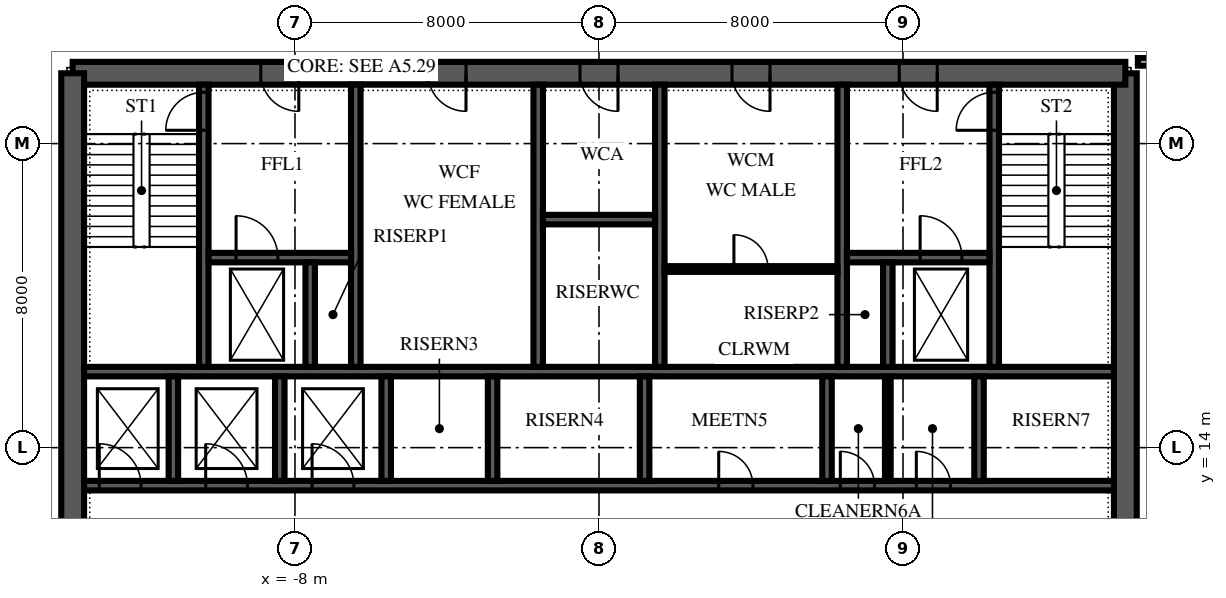
"""IFC4 building model, lengths in metres.
Left out: names, types, materials, properties, quantities, classifications, styles, units other than length and angle.
Written with IfcOpenShell. Run it as: python <this file> out.ifc"""

import sys

from ifc_helpers import new_model, si_unit, direction, frame, frame_2d, origin, place, context, subcontext, project, spatial, polyline, rectangle, outline, extrude, element, fill, save


model = new_model("IFC4")
c1 = context("Model", 3, precision=1e-05, world=origin(), true_north=direction((0.0, 1.0)))
c2 = subcontext(c1, "Body", "Model", "MODEL_VIEW")
j1 = project(units=[si_unit("LENGTHUNIT", "METRE"), si_unit("PLANEANGLEUNIT", "RADIAN")], contexts=[c1])
p1 = place(None, origin())
s1 = spatial("IfcSite", under=j1, at=p1, CompositionType="ELEMENT")
p2 = place(p1, origin())
s2 = spatial("IfcBuilding", under=s1, at=p2, CompositionType="ELEMENT")
p3 = place(p2, frame((0.0, 0.0, 202.0)))
s3 = spatial("IfcBuildingStorey", under=s2, at=p3, CompositionType="ELEMENT", Elevation=202.0)
p4 = place(p3, frame((13.85, 6.15, 0.0), z_axis=(0.0, 0.0, 1.0), x_axis=(0.0, 1.0, 0.0)))
e1 = element("IfcWall", 1, at=p4, inside=s3, PredefinedType="SHEAR", context=c2, shape_type="SweptSolid", body=[
    extrude(outline(polyline([(0.0, -0.3), (17.7, -0.3), (17.7, 0.0), (17.4, 0.0), (17.4, 0.3), (0.3, 0.3), (0.3, 0.0), (0.0, 0.0), (0.0, -0.3)])), origin(), (0.0, 0.0, 1.0), 4.0),
])
p5 = place(p4, frame((4.15, 0.0, 0.0)))
e2 = element("IfcOpeningElement", 2, at=p5, cuts=e1, PredefinedType="OPENING", context=c2, shape_type="SweptSolid", body=[
    extrude(rectangle(XDim=1.8, YDim=2.4, at=frame_2d((0.9, 1.2))), frame((0.0, 0.315, 0.0), z_axis=(0.0, -1.0, 0.0), x_axis=(1.0, 0.0, 0.0)), (0.0, 0.0, 1.0), 0.63),
])
p6 = place(p3, frame((13.85, 23.85, 0.0), z_axis=(0.0, 0.0, 1.0), x_axis=(-1.0, 0.0, 0.0)))
e3 = element("IfcWall", 3, at=p6, inside=s3, PredefinedType="SHEAR", context=c2, shape_type="SweptSolid", body=[
    extrude(rectangle(XDim=27.7, YDim=0.6, at=frame_2d((13.85, 0.0))), origin(), (0.0, 0.0, 1.0), 4.0),
])
p7 = place(p6, frame((21.75, 0.0, 0.0)))
e4 = element("IfcOpeningElement", 4, at=p7, cuts=e3, PredefinedType="OPENING", context=c2, shape_type="SweptSolid", body=[
    extrude(rectangle(XDim=1.0, YDim=2.1, at=frame_2d((0.5, 1.05))), frame((0.0, 0.315, 0.0), z_axis=(0.0, -1.0, 0.0), x_axis=(1.0, 0.0, 0.0)), (0.0, 0.0, 1.0), 0.63),
])
p8 = place(p6, frame((4.95, 0.0, 0.0)))
e5 = element("IfcOpeningElement", 5, at=p8, cuts=e3, PredefinedType="OPENING", context=c2, shape_type="SweptSolid", body=[
    extrude(rectangle(XDim=1.0, YDim=2.1, at=frame_2d((0.5, 1.05))), frame((0.0, 0.315, 0.0), z_axis=(0.0, -1.0, 0.0), x_axis=(1.0, 0.0, 0.0)), (0.0, 0.0, 1.0), 0.63),
])
p9 = place(p6, frame((17.35, 0.0, 0.0)))
e6 = element("IfcOpeningElement", 6, at=p9, cuts=e3, PredefinedType="OPENING", context=c2, shape_type="SweptSolid", body=[
    extrude(rectangle(XDim=1.0, YDim=2.1, at=frame_2d((0.5, 1.05))), frame((0.0, 0.315, 0.0), z_axis=(0.0, -1.0, 0.0), x_axis=(1.0, 0.0, 0.0)), (0.0, 0.0, 1.0), 0.63),
])
p10 = place(p6, frame((13.35, 0.0, 0.0)))
e7 = element("IfcOpeningElement", 7, at=p10, cuts=e3, PredefinedType="OPENING", context=c2, shape_type="SweptSolid", body=[
    extrude(rectangle(XDim=1.0, YDim=2.1, at=frame_2d((0.5, 1.05))), frame((0.0, 0.315, 0.0), z_axis=(0.0, -1.0, 0.0), x_axis=(1.0, 0.0, 0.0)), (0.0, 0.0, 1.0), 0.63),
])
p11 = place(p6, frame((9.35, 0.0, 0.0)))
e8 = element("IfcOpeningElement", 8, at=p11, cuts=e3, PredefinedType="OPENING", context=c2, shape_type="SweptSolid", body=[
    extrude(rectangle(XDim=1.0, YDim=2.1, at=frame_2d((0.5, 1.05))), frame((0.0, 0.315, 0.0), z_axis=(0.0, -1.0, 0.0), x_axis=(1.0, 0.0, 0.0)), (0.0, 0.0, 1.0), 0.63),
])
p12 = place(p3, frame((-13.85, 23.85, 0.0), z_axis=(0.0, 0.0, 1.0), x_axis=(0.0, -1.0, 0.0)))
e9 = element("IfcWall", 9, at=p12, inside=s3, PredefinedType="SHEAR", context=c2, shape_type="SweptSolid", body=[
    extrude(outline(polyline([(0.0, -0.3), (17.7, -0.3), (17.7, 0.0), (17.4, 0.0), (17.4, 0.3), (0.3, 0.3), (0.3, 0.0), (0.0, 0.0), (0.0, -0.3)])), origin(), (0.0, 0.0, 1.0), 4.0),
])
p13 = place(p12, frame((11.75, 0.0, 0.0)))
e10 = element("IfcOpeningElement", 10, at=p13, cuts=e9, PredefinedType="OPENING", context=c2, shape_type="SweptSolid", body=[
    extrude(rectangle(XDim=1.8, YDim=2.4, at=frame_2d((0.9, 1.2))), frame((0.0, 0.315, 0.0), z_axis=(0.0, -1.0, 0.0), x_axis=(1.0, 0.0, 0.0)), (0.0, 0.0, 1.0), 0.63),
])
p14 = place(p3, frame((-13.55, 13.0, 0.0), z_axis=(0.0, 0.0, 1.0), x_axis=(1.0, 0.0, 0.0)))
e11 = element("IfcWall", 11, at=p14, inside=s3, PredefinedType="SHEAR", context=c2, shape_type="SweptSolid", body=[
    extrude(rectangle(XDim=27.1, YDim=0.25, at=frame_2d((13.55, 0.0))), origin(), (0.0, 0.0, 1.0), 4.0),
])
p15 = place(p14, frame((0.4, 0.0, 0.0)))
e12 = element("IfcOpeningElement", 12, at=p15, cuts=e11, PredefinedType="OPENING", context=c2, shape_type="SweptSolid", body=[
    extrude(rectangle(XDim=1.1, YDim=2.1, at=frame_2d((0.55, 1.05))), frame((0.0, 0.14, 0.0), z_axis=(0.0, -1.0, 0.0), x_axis=(1.0, 0.0, 0.0)), (0.0, 0.0, 1.0), 0.28),
])
p16 = place(p14, frame((3.2, 0.0, 0.0)))
e13 = element("IfcOpeningElement", 13, at=p16, cuts=e11, PredefinedType="OPENING", context=c2, shape_type="SweptSolid", body=[
    extrude(rectangle(XDim=1.1, YDim=2.1, at=frame_2d((0.55, 1.05))), frame((0.0, 0.14, 0.0), z_axis=(0.0, -1.0, 0.0), x_axis=(1.0, 0.0, 0.0)), (0.0, 0.0, 1.0), 0.28),
])
p17 = place(p14, frame((6.0, 0.0, 0.0)))
e14 = element("IfcOpeningElement", 14, at=p17, cuts=e11, PredefinedType="OPENING", context=c2, shape_type="SweptSolid", body=[
    extrude(rectangle(XDim=1.1, YDim=2.1, at=frame_2d((0.55, 1.05))), frame((0.0, 0.14, 0.0), z_axis=(0.0, -1.0, 0.0), x_axis=(1.0, 0.0, 0.0)), (0.0, 0.0, 1.0), 0.28),
])
p18 = place(p14, frame((16.7, 0.0, 0.0)))
e15 = element("IfcOpeningElement", 15, at=p18, cuts=e11, PredefinedType="OPENING", context=c2, shape_type="SweptSolid", body=[
    extrude(rectangle(XDim=0.9, YDim=2.1, at=frame_2d((0.45, 1.05))), frame((0.0, 0.14, 0.0), z_axis=(0.0, -1.0, 0.0), x_axis=(1.0, 0.0, 0.0)), (0.0, 0.0, 1.0), 0.28),
])
p19 = place(p14, frame((19.9, 0.0, 0.0)))
e16 = element("IfcOpeningElement", 16, at=p19, cuts=e11, PredefinedType="OPENING", context=c2, shape_type="SweptSolid", body=[
    extrude(rectangle(XDim=0.9, YDim=2.1, at=frame_2d((0.45, 1.05))), frame((0.0, 0.14, 0.0), z_axis=(0.0, -1.0, 0.0), x_axis=(1.0, 0.0, 0.0)), (0.0, 0.0, 1.0), 0.28),
])
p20 = place(p14, frame((21.9, 0.0, 0.0)))
e17 = element("IfcOpeningElement", 17, at=p20, cuts=e11, PredefinedType="OPENING", context=c2, shape_type="SweptSolid", body=[
    extrude(rectangle(XDim=0.9, YDim=2.1, at=frame_2d((0.45, 1.05))), frame((0.0, 0.14, 0.0), z_axis=(0.0, -1.0, 0.0), x_axis=(1.0, 0.0, 0.0)), (0.0, 0.0, 1.0), 0.28),
])
p21 = place(p3, frame((-13.55, 16.0, 0.0), z_axis=(0.0, 0.0, 1.0), x_axis=(1.0, 0.0, 0.0)))
e18 = element("IfcWall", 18, at=p21, inside=s3, PredefinedType="SHEAR", context=c2, shape_type="SweptSolid", body=[
    extrude(rectangle(XDim=27.1, YDim=0.25, at=frame_2d((13.55, 0.0))), origin(), (0.0, 0.0, 1.0), 4.0),
])
for number, where, z_axis, x_axis in (
    (19, (-11.2, 13.125, 0.0), (0.0, 0.0, 1.0), (0.0, 1.0, 0.0)),
    (20, (-8.4, 13.125, 0.0), (0.0, 0.0, 1.0), (0.0, 1.0, 0.0)),
    (21, (-5.6, 13.125, 0.0), (0.0, 0.0, 1.0), (0.0, 1.0, 0.0)),
    (22, (-2.8, 13.125, 0.0), (0.0, 0.0, 1.0), (0.0, 1.0, 0.0)),
    (23, (1.2, 13.125, 0.0), (0.0, 0.0, 1.0), (0.0, 1.0, 0.0)),
    (24, (6.0, 13.125, 0.0), (0.0, 0.0, 1.0), (0.0, 1.0, 0.0)),
    (25, (10.0, 13.125, 0.0), (0.0, 0.0, 1.0), (0.0, 1.0, 0.0)),
):
    element("IfcWall", number, at=place(p3, frame(where, z_axis=z_axis, x_axis=x_axis)), inside=s3, PredefinedType="SHEAR", context=c2, shape_type="SweptSolid", body=[
        extrude(rectangle(XDim=2.75, YDim=0.25, at=frame_2d((1.375, 0.0))), origin(), (0.0, 0.0, 1.0), 4.0),
    ])
p22 = place(p3, frame((-10.4, 16.125, 0.0), z_axis=(0.0, 0.0, 1.0), x_axis=(0.0, 1.0, 0.0)))
e26 = element("IfcWall", 26, at=p22, inside=s3, PredefinedType="SHEAR", context=c2, shape_type="SweptSolid", body=[
    extrude(rectangle(XDim=7.425, YDim=0.25, at=frame_2d((3.712, 0.0))), origin(), (0.0, 0.0, 1.0), 4.0),
])
p23 = place(p22, frame((6.225, 0.0, 0.0)))
e27 = element("IfcOpeningElement", 27, at=p23, cuts=e26, PredefinedType="OPENING", context=c2, shape_type="SweptSolid", body=[
    extrude(rectangle(XDim=1.0, YDim=2.1, at=frame_2d((0.5, 1.05))), frame((0.0, 0.14, 0.0), z_axis=(0.0, -1.0, 0.0), x_axis=(1.0, 0.0, 0.0)), (0.0, 0.0, 1.0), 0.28),
])
for number, where, z_axis, x_axis in (
    (28, (-6.4, 16.125, 0.0), (0.0, 0.0, 1.0), (0.0, 1.0, 0.0)),
    (29, (-1.6, 16.125, 0.0), (0.0, 0.0, 1.0), (0.0, 1.0, 0.0)),
    (30, (1.6, 16.125, 0.0), (0.0, 0.0, 1.0), (0.0, 1.0, 0.0)),
    (31, (6.4, 16.125, 0.0), (0.0, 0.0, 1.0), (0.0, 1.0, 0.0)),
):
    element("IfcWall", number, at=place(p3, frame(where, z_axis=z_axis, x_axis=x_axis)), inside=s3, PredefinedType="SHEAR", context=c2, shape_type="SweptSolid", body=[
        extrude(rectangle(XDim=7.425, YDim=0.25, at=frame_2d((3.712, 0.0))), origin(), (0.0, 0.0, 1.0), 4.0),
    ])
p24 = place(p3, frame((10.4, 16.125, 0.0), z_axis=(0.0, 0.0, 1.0), x_axis=(0.0, 1.0, 0.0)))
e32 = element("IfcWall", 32, at=p24, inside=s3, PredefinedType="SHEAR", context=c2, shape_type="SweptSolid", body=[
    extrude(rectangle(XDim=7.425, YDim=0.25, at=frame_2d((3.712, 0.0))), origin(), (0.0, 0.0, 1.0), 4.0),
])
p25 = place(p24, frame((6.225, 0.0, 0.0)))
e33 = element("IfcOpeningElement", 33, at=p25, cuts=e32, PredefinedType="OPENING", context=c2, shape_type="SweptSolid", body=[
    extrude(rectangle(XDim=1.0, YDim=2.1, at=frame_2d((0.5, 1.05))), frame((0.0, 0.14, 0.0), z_axis=(0.0, -1.0, 0.0), x_axis=(1.0, 0.0, 0.0)), (0.0, 0.0, 1.0), 0.28),
])
p26 = place(p3, frame((-10.275, 19.0, 0.0), z_axis=(0.0, 0.0, 1.0), x_axis=(1.0, 0.0, 0.0)))
e34 = element("IfcWall", 34, at=p26, inside=s3, PredefinedType="SHEAR", context=c2, shape_type="SweptSolid", body=[
    extrude(rectangle(XDim=3.75, YDim=0.25, at=frame_2d((1.875, 0.0))), origin(), (0.0, 0.0, 1.0), 4.0),
])
p27 = place(p26, frame((0.725, 0.0, 0.0)))
e35 = element("IfcOpeningElement", 35, at=p27, cuts=e34, PredefinedType="OPENING", context=c2, shape_type="SweptSolid", body=[
    extrude(rectangle(XDim=1.1, YDim=2.1, at=frame_2d((0.55, 1.05))), frame((0.0, 0.14, 0.0), z_axis=(0.0, -1.0, 0.0), x_axis=(1.0, 0.0, 0.0)), (0.0, 0.0, 1.0), 0.28),
])
p28 = place(p3, frame((6.525, 19.0, 0.0), z_axis=(0.0, 0.0, 1.0), x_axis=(1.0, 0.0, 0.0)))
e36 = element("IfcWall", 36, at=p28, inside=s3, PredefinedType="SHEAR", context=c2, shape_type="SweptSolid", body=[
    extrude(rectangle(XDim=3.75, YDim=0.25, at=frame_2d((1.875, 0.0))), origin(), (0.0, 0.0, 1.0), 4.0),
])
p29 = place(p28, frame((1.925, 0.0, 0.0)))
e37 = element("IfcOpeningElement", 37, at=p29, cuts=e36, PredefinedType="OPENING", context=c2, shape_type="SweptSolid", body=[
    extrude(rectangle(XDim=1.1, YDim=2.1, at=frame_2d((0.55, 1.05))), frame((0.0, 0.14, 0.0), z_axis=(0.0, -1.0, 0.0), x_axis=(1.0, 0.0, 0.0)), (0.0, 0.0, 1.0), 0.28),
])
for number, where, z_axis, x_axis in (
    (38, (-7.6, 16.125, 0.0), (0.0, 0.0, 1.0), (0.0, 1.0, 0.0)),
    (39, (7.6, 16.125, 0.0), (0.0, 0.0, 1.0), (0.0, 1.0, 0.0)),
):
    element("IfcWall", number, at=place(p3, frame(where, z_axis=z_axis, x_axis=x_axis)), inside=s3, PredefinedType="SHEAR", context=c2, shape_type="SweptSolid", body=[
        extrude(rectangle(XDim=2.75, YDim=0.25, at=frame_2d((1.375, 0.0))), origin(), (0.0, 0.0, 1.0), 4.0),
    ])
p30 = place(p3, frame((-1.475, 20.0, 0.0), z_axis=(0.0, 0.0, 1.0), x_axis=(1.0, 0.0, 0.0)))
e40 = element("IfcWall", 40, at=p30, inside=s3, PredefinedType="SHEAR", context=c2, shape_type="SweptSolid", body=[
    extrude(rectangle(XDim=2.95, YDim=0.25, at=frame_2d((1.475, 0.0))), origin(), (0.0, 0.0, 1.0), 4.0),
])
p31 = place(p3, frame((1.725, 18.7, 0.0), z_axis=(0.0, 0.0, 1.0), x_axis=(1.0, 0.0, 0.0)))
e41 = element("IfcWall", 41, at=p31, inside=s3, PredefinedType="PARTITIONING", context=c2, shape_type="SweptSolid", body=[
    extrude(rectangle(XDim=4.55, YDim=0.15, at=frame_2d((2.275, 0.0))), origin(), (0.0, 0.0, 1.0), 3.85),
])
p32 = place(p31, frame((1.825, 0.0, 0.0)))
e42 = element("IfcOpeningElement", 42, at=p32, cuts=e41, PredefinedType="OPENING", context=c2, shape_type="SweptSolid", body=[
    extrude(rectangle(XDim=0.9, YDim=2.1, at=frame_2d((0.45, 1.05))), frame((0.0, 0.09, 0.0), z_axis=(0.0, -1.0, 0.0), x_axis=(1.0, 0.0, 0.0)), (0.0, 0.0, 1.0), 0.18),
])
p33 = place(p3, frame((7.6, 13.125, 0.0), z_axis=(0.0, 0.0, 1.0), x_axis=(0.0, 1.0, 0.0)))
e43 = element("IfcWall", 43, at=p33, inside=s3, PredefinedType="PARTITIONING", context=c2, shape_type="SweptSolid", body=[
    extrude(rectangle(XDim=2.75, YDim=0.15, at=frame_2d((1.375, 0.0))), origin(), (0.0, 0.0, 1.0), 3.85),
])
p34 = place(p3, frame((14.18, 24.15, 0.0), z_axis=(0.0, 0.0, 1.0), x_axis=(1.0, 0.0, 0.0)))
e44 = element("IfcWall", 44, at=p34, inside=s3, PredefinedType="PARTITIONING", context=c2, shape_type="SweptSolid", body=[
    extrude(rectangle(XDim=1.92, YDim=0.2, at=frame_2d((0.96, 0.0))), origin(), (0.0, 0.0, 1.0), 3.4),
])
p35 = place(p7, origin())
e45 = element("IfcDoor", 45, at=p35, inside=s3, OperationType="SINGLE_SWING_RIGHT", PredefinedType="DOOR", context=c2, shape_type="SweptSolid", body=[
    extrude(rectangle(XDim=1.0, YDim=2.1, at=frame_2d((0.5, 1.05))), frame((0.0, 0.3, 0.0), z_axis=(0.0, -1.0, 0.0), x_axis=(1.0, 0.0, 0.0)), (0.0, 0.0, 1.0), 0.6),
])
fill(e4, e45)
p36 = place(p8, origin())
e46 = element("IfcDoor", 46, at=p36, inside=s3, OperationType="SINGLE_SWING_RIGHT", PredefinedType="DOOR", context=c2, shape_type="SweptSolid", body=[
    extrude(rectangle(XDim=1.0, YDim=2.1, at=frame_2d((0.5, 1.05))), frame((0.0, 0.3, 0.0), z_axis=(0.0, -1.0, 0.0), x_axis=(1.0, 0.0, 0.0)), (0.0, 0.0, 1.0), 0.6),
])
fill(e5, e46)
p37 = place(p9, origin())
e47 = element("IfcDoor", 47, at=p37, inside=s3, OperationType="SINGLE_SWING_LEFT", PredefinedType="DOOR", context=c2, shape_type="SweptSolid", body=[
    extrude(rectangle(XDim=1.0, YDim=2.1, at=frame_2d((0.5, 1.05))), frame((0.0, 0.3, 0.0), z_axis=(0.0, -1.0, 0.0), x_axis=(1.0, 0.0, 0.0)), (0.0, 0.0, 1.0), 0.6),
])
fill(e6, e47)
p38 = place(p10, origin())
e48 = element("IfcDoor", 48, at=p38, inside=s3, OperationType="SINGLE_SWING_LEFT", PredefinedType="DOOR", context=c2, shape_type="SweptSolid", body=[
    extrude(rectangle(XDim=1.0, YDim=2.1, at=frame_2d((0.5, 1.05))), frame((0.0, 0.3, 0.0), z_axis=(0.0, -1.0, 0.0), x_axis=(1.0, 0.0, 0.0)), (0.0, 0.0, 1.0), 0.6),
])
fill(e7, e48)
p39 = place(p11, origin())
e49 = element("IfcDoor", 49, at=p39, inside=s3, OperationType="SINGLE_SWING_LEFT", PredefinedType="DOOR", context=c2, shape_type="SweptSolid", body=[
    extrude(rectangle(XDim=1.0, YDim=2.1, at=frame_2d((0.5, 1.05))), frame((0.0, 0.3, 0.0), z_axis=(0.0, -1.0, 0.0), x_axis=(1.0, 0.0, 0.0)), (0.0, 0.0, 1.0), 0.6),
])
fill(e8, e49)
p40 = place(p23, origin())
e50 = element("IfcDoor", 50, at=p40, inside=s3, OperationType="SINGLE_SWING_LEFT", PredefinedType="DOOR", context=c2, shape_type="SweptSolid", body=[
    extrude(rectangle(XDim=1.0, YDim=2.1, at=frame_2d((0.5, 1.05))), frame((0.0, 0.125, 0.0), z_axis=(0.0, -1.0, 0.0), x_axis=(1.0, 0.0, 0.0)), (0.0, 0.0, 1.0), 0.25),
])
fill(e27, e50)
p41 = place(p25, origin())
e51 = element("IfcDoor", 51, at=p41, inside=s3, OperationType="SINGLE_SWING_LEFT", PredefinedType="DOOR", context=c2, shape_type="SweptSolid", body=[
    extrude(rectangle(XDim=1.0, YDim=2.1, at=frame_2d((0.5, 1.05))), frame((0.0, 0.125, 0.0), z_axis=(0.0, -1.0, 0.0), x_axis=(1.0, 0.0, 0.0)), (0.0, 0.0, 1.0), 0.25),
])
fill(e33, e51)
p42 = place(p15, origin())
e52 = element("IfcDoor", 52, at=p42, inside=s3, OperationType="SLIDING_TO_LEFT", PredefinedType="DOOR", context=c2, shape_type="SweptSolid", body=[
    extrude(rectangle(XDim=1.1, YDim=2.1, at=frame_2d((0.55, 1.05))), frame((0.0, 0.125, 0.0), z_axis=(0.0, -1.0, 0.0), x_axis=(1.0, 0.0, 0.0)), (0.0, 0.0, 1.0), 0.25),
])
fill(e12, e52)
p43 = place(p16, origin())
e53 = element("IfcDoor", 53, at=p43, inside=s3, OperationType="SLIDING_TO_LEFT", PredefinedType="DOOR", context=c2, shape_type="SweptSolid", body=[
    extrude(rectangle(XDim=1.1, YDim=2.1, at=frame_2d((0.55, 1.05))), frame((0.0, 0.125, 0.0), z_axis=(0.0, -1.0, 0.0), x_axis=(1.0, 0.0, 0.0)), (0.0, 0.0, 1.0), 0.25),
])
fill(e13, e53)
p44 = place(p17, origin())
e54 = element("IfcDoor", 54, at=p44, inside=s3, OperationType="SLIDING_TO_LEFT", PredefinedType="DOOR", context=c2, shape_type="SweptSolid", body=[
    extrude(rectangle(XDim=1.1, YDim=2.1, at=frame_2d((0.55, 1.05))), frame((0.0, 0.125, 0.0), z_axis=(0.0, -1.0, 0.0), x_axis=(1.0, 0.0, 0.0)), (0.0, 0.0, 1.0), 0.25),
])
fill(e14, e54)
p45 = place(p29, origin())
e55 = element("IfcDoor", 55, at=p45, inside=s3, OperationType="SLIDING_TO_RIGHT", PredefinedType="DOOR", context=c2, shape_type="SweptSolid", body=[
    extrude(rectangle(XDim=1.1, YDim=2.1, at=frame_2d((0.55, 1.05))), frame((0.0, 0.125, 0.0), z_axis=(0.0, -1.0, 0.0), x_axis=(1.0, 0.0, 0.0)), (0.0, 0.0, 1.0), 0.25),
])
fill(e37, e55)
p46 = place(p27, origin())
e56 = element("IfcDoor", 56, at=p46, inside=s3, OperationType="SLIDING_TO_RIGHT", PredefinedType="DOOR", context=c2, shape_type="SweptSolid", body=[
    extrude(rectangle(XDim=1.1, YDim=2.1, at=frame_2d((0.55, 1.05))), frame((0.0, 0.125, 0.0), z_axis=(0.0, -1.0, 0.0), x_axis=(1.0, 0.0, 0.0)), (0.0, 0.0, 1.0), 0.25),
])
fill(e35, e56)
p47 = place(p18, origin())
e57 = element("IfcDoor", 57, at=p47, inside=s3, OperationType="SINGLE_SWING_LEFT", PredefinedType="DOOR", context=c2, shape_type="SweptSolid", body=[
    extrude(rectangle(XDim=0.9, YDim=2.1, at=frame_2d((0.45, 1.05))), frame((0.0, 0.125, 0.0), z_axis=(0.0, -1.0, 0.0), x_axis=(1.0, 0.0, 0.0)), (0.0, 0.0, 1.0), 0.25),
])
fill(e15, e57)
p48 = place(p19, origin())
e58 = element("IfcDoor", 58, at=p48, inside=s3, OperationType="SINGLE_SWING_LEFT", PredefinedType="DOOR", context=c2, shape_type="SweptSolid", body=[
    extrude(rectangle(XDim=0.9, YDim=2.1, at=frame_2d((0.45, 1.05))), frame((0.0, 0.125, 0.0), z_axis=(0.0, -1.0, 0.0), x_axis=(1.0, 0.0, 0.0)), (0.0, 0.0, 1.0), 0.25),
])
fill(e16, e58)
p49 = place(p20, origin())
e59 = element("IfcDoor", 59, at=p49, inside=s3, OperationType="SINGLE_SWING_LEFT", PredefinedType="DOOR", context=c2, shape_type="SweptSolid", body=[
    extrude(rectangle(XDim=0.9, YDim=2.1, at=frame_2d((0.45, 1.05))), frame((0.0, 0.125, 0.0), z_axis=(0.0, -1.0, 0.0), x_axis=(1.0, 0.0, 0.0)), (0.0, 0.0, 1.0), 0.25),
])
fill(e17, e59)
p50 = place(p32, origin())
e60 = element("IfcDoor", 60, at=p50, inside=s3, OperationType="SINGLE_SWING_LEFT", PredefinedType="DOOR", context=c2, shape_type="SweptSolid", body=[
    extrude(rectangle(XDim=0.9, YDim=2.1, at=frame_2d((0.45, 1.05))), frame((0.0, 0.075, 0.0), z_axis=(0.0, -1.0, 0.0), x_axis=(1.0, 0.0, 0.0)), (0.0, 0.0, 1.0), 0.149),
])
fill(e42, e60)
save(model, sys.argv[1])
